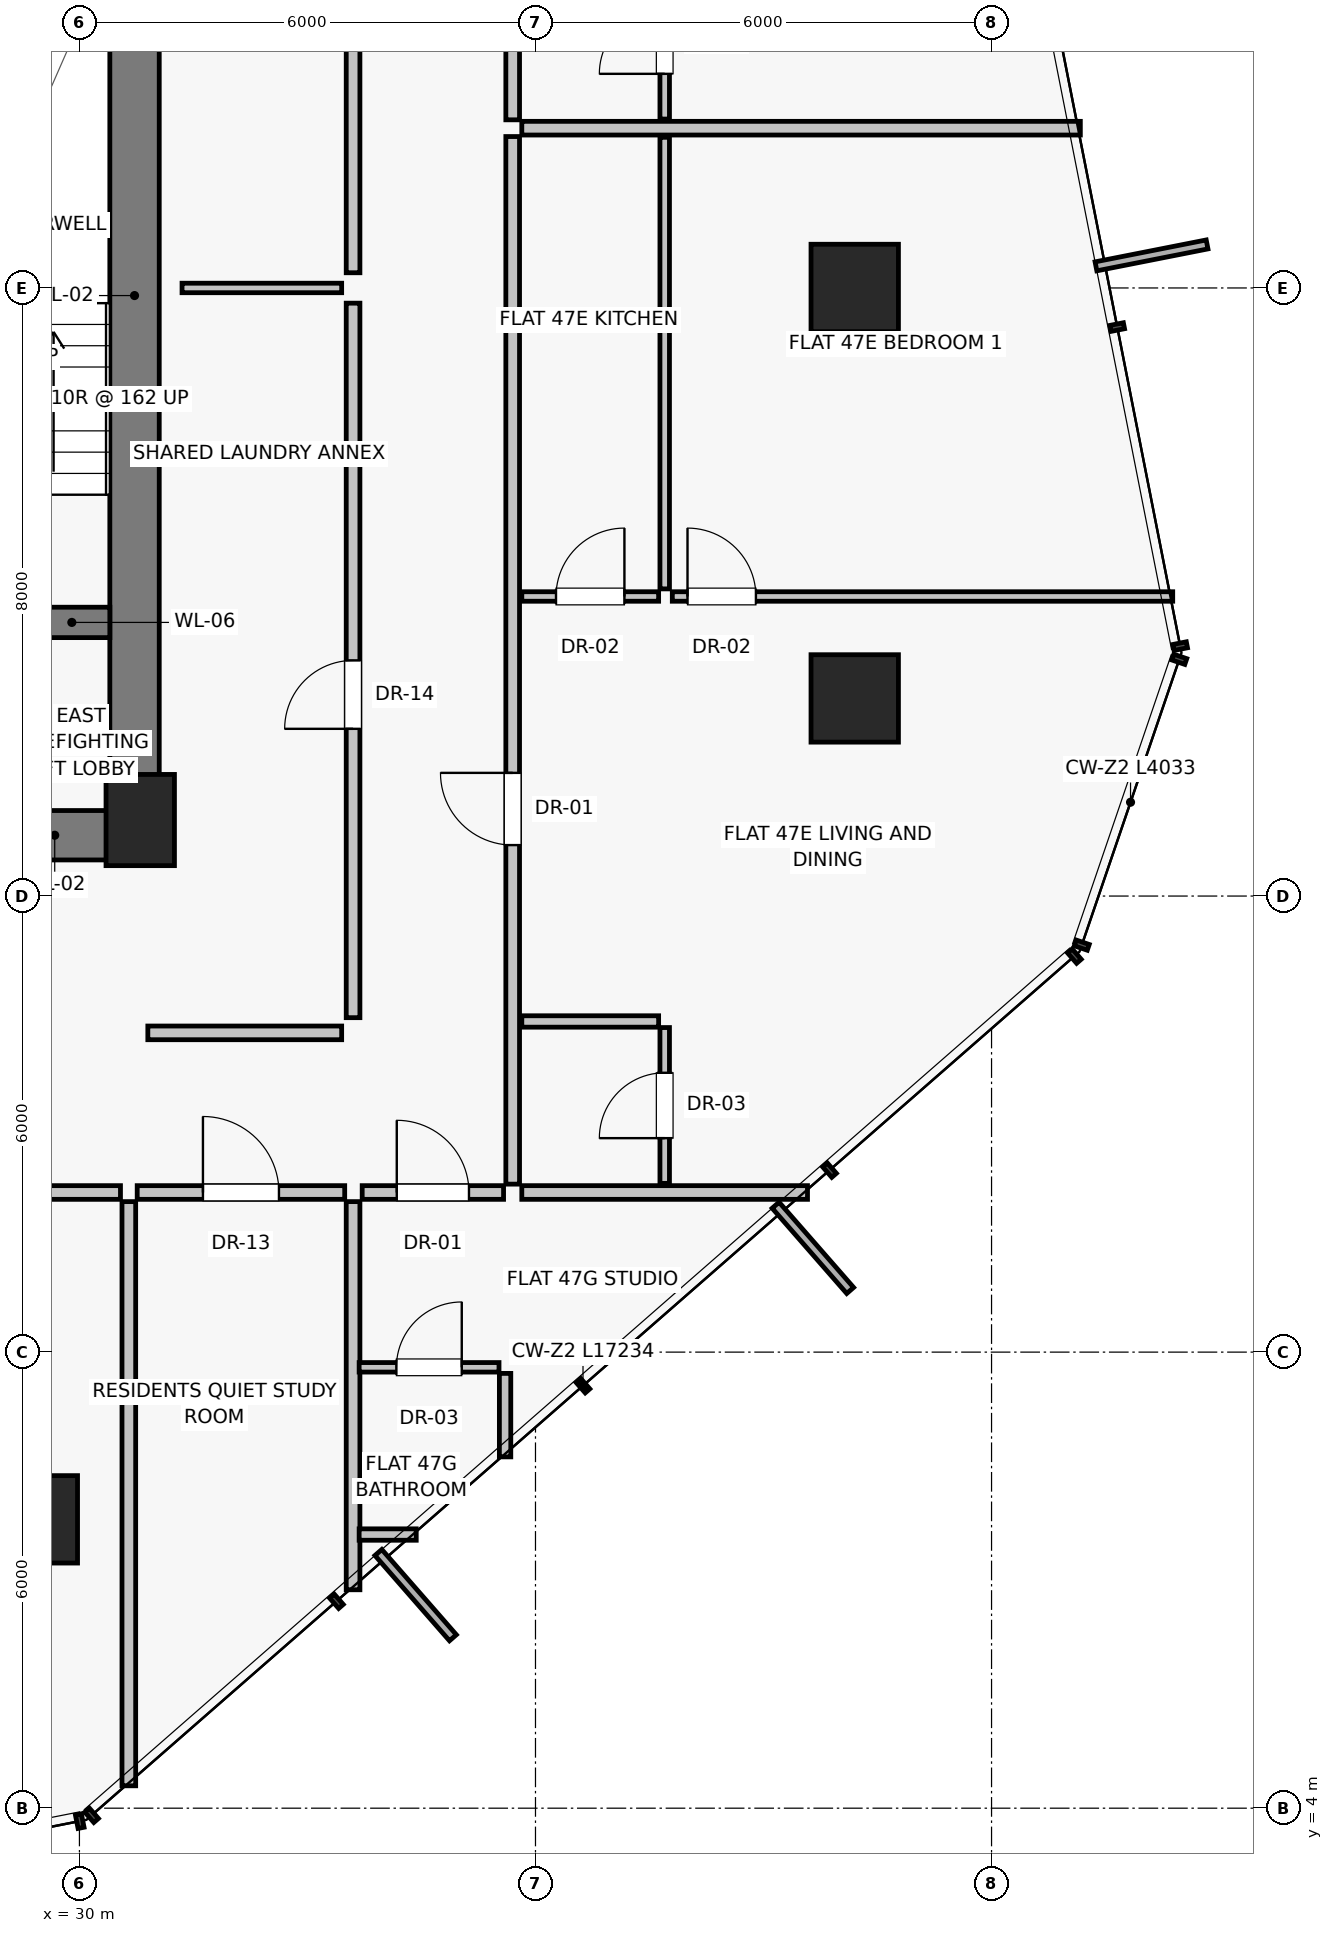
"""IFC4 building model, lengths in metres.
Left out: names, types, materials, properties, quantities, classifications, styles, units other than length and angle.
Written with IfcOpenShell. Run it as: python <this file> out.ifc"""

import sys

from ifc_helpers import new_model, si_unit, direction, frame, frame_2d, origin, origin_2d, place, context, subcontext, project, spatial, rectangle, extrude, source, transform, mapped, element, fill, save


model = new_model("IFC4")
c1 = context("Model", 3, precision=1e-05, world=origin(), true_north=direction((0.0, 1.0)))
c2 = subcontext(c1, "Body", "Model", "MODEL_VIEW")
j1 = project(units=[si_unit("LENGTHUNIT", "METRE"), si_unit("PLANEANGLEUNIT", "RADIAN")], contexts=[c1])
p1 = place(None, origin())
s1 = spatial("IfcSite", under=j1, at=p1, CompositionType="ELEMENT")
p2 = place(p1, origin())
s2 = spatial("IfcBuilding", under=s1, at=p2, CompositionType="ELEMENT")
p3 = place(p2, frame((0.0, 0.0, 166.3)))
s3 = spatial("IfcBuildingStorey", under=s2, at=p3, CompositionType="ELEMENT", Elevation=166.3)
p4 = place(p3, frame((30.8, 17.0, 0.0), z_axis=(0.0, 0.0, 1.0), x_axis=(1.0, 0.0, 0.0)))
e1 = element("IfcColumn", 1, at=p4, inside=s3, PredefinedType="PILASTER", context=c2, shape_type="SweptSolid", body=[
    extrude(rectangle(XDim=0.9, YDim=1.2, at=origin_2d()), origin(), (0.0, 0.0, 1.0), 3.25),
])
for number, where, z_axis, x_axis in (
    (2, (40.2, 18.6, 0.0), (0.0, 0.0, 1.0), (1.0, 0.0, 0.0)),
    (3, (40.2, 24.0, 0.0), (0.0, 0.0, 1.0), (1.0, 0.0, 0.0)),
    (4, (29.4, 7.8, 0.0), (0.0, 0.0, 1.0), (1.0, 0.0, 0.0)),
):
    element("IfcColumn", number, at=place(p3, frame(where, z_axis=z_axis, x_axis=x_axis)), inside=s3, PredefinedType="COLUMN", context=c2, shape_type="SweptSolid", body=[
        extrude(rectangle(XDim=1.15, YDim=1.15, at=origin_2d()), origin(), (0.0, 0.0, 1.0), 3.25),
    ])
p5 = place(p3, frame((30.725, 16.8, 0.0), z_axis=(0.0, 0.0, 1.0), x_axis=(0.0, 1.0, 0.0)))
e5 = element("IfcWall", 5, at=p5, inside=s3, PredefinedType="SHEAR", context=c2, shape_type="SweptSolid", body=[
    extrude(rectangle(XDim=14.2, YDim=0.65, at=frame_2d((7.1, 0.0))), origin(), (0.0, 0.0, 1.0), 2.93),
])
p6 = place(p3, frame((24.95, 16.8, 0.0), z_axis=(0.0, 0.0, 1.0), x_axis=(1.0, 0.0, 0.0)))
e6 = element("IfcWall", 6, at=p6, inside=s3, PredefinedType="SHEAR", context=c2, shape_type="SweptSolid", body=[
    extrude(rectangle(XDim=5.85, YDim=0.65, at=frame_2d((2.925, 0.0))), origin(), (0.0, 0.0, 1.0), 2.93),
])
p7 = place(p6, frame((2.15, 0.0, 0.0)))
e7 = element("IfcOpeningElement", 7, at=p7, cuts=e6, PredefinedType="OPENING", context=c2, shape_type="SweptSolid", body=[
    extrude(rectangle(XDim=1.2, YDim=2.03, at=frame_2d((0.6, 1.015))), frame((0.0, 0.335, 0.0), z_axis=(0.0, -1.0, 0.0), x_axis=(1.0, 0.0, 0.0)), (0.0, 0.0, 1.0), 0.67),
])
p8 = place(p3, frame((27.0, 19.6, 0.0), z_axis=(0.0, 0.0, 1.0), x_axis=(1.0, 0.0, 0.0)))
e8 = element("IfcWall", 8, at=p8, inside=s3, PredefinedType="SHEAR", context=c2, shape_type="SweptSolid", body=[
    extrude(rectangle(XDim=3.4, YDim=0.4, at=frame_2d((1.7, 0.0))), origin(), (0.0, 0.0, 1.0), 2.93),
])
p9 = place(p8, frame((1.05, 0.0, 0.0)))
e9 = element("IfcOpeningElement", 9, at=p9, cuts=e8, PredefinedType="OPENING", context=c2, shape_type="SweptSolid", body=[
    extrude(rectangle(XDim=1.1, YDim=2.03, at=frame_2d((0.55, 1.015))), frame((0.0, 0.21, 0.0), z_axis=(0.0, -1.0, 0.0), x_axis=(1.0, 0.0, 0.0)), (0.0, 0.0, 1.0), 0.42),
])
p10 = place(p3, frame((33.6, 14.4, 0.0), z_axis=(0.0, 0.0, 1.0), x_axis=(0.0, 1.0, 0.0)))
e10 = element("IfcWall", 10, at=p10, inside=s3, PredefinedType="PARTITIONING", context=c2, shape_type="SweptSolid", body=[
    extrude(rectangle(XDim=9.4, YDim=0.18, at=frame_2d((4.7, 0.0))), origin(), (0.0, 0.0, 1.0), 2.93),
])
p11 = place(p10, frame((3.8, 0.0, 0.0)))
e11 = element("IfcOpeningElement", 11, at=p11, cuts=e10, PredefinedType="OPENING", context=c2, shape_type="SweptSolid", body=[
    extrude(rectangle(XDim=0.9, YDim=2.01, at=frame_2d((0.45, 1.005))), frame((0.0, 0.1, 0.0), z_axis=(0.0, -1.0, 0.0), x_axis=(1.0, 0.0, 0.0)), (0.0, 0.0, 1.0), 0.2),
])
p12 = place(p3, frame((33.6, 24.2, 0.0), z_axis=(0.0, 0.0, 1.0), x_axis=(0.0, 1.0, 0.0)))
e12 = element("IfcWall", 12, at=p12, inside=s3, PredefinedType="PARTITIONING", context=c2, shape_type="SweptSolid", body=[
    extrude(rectangle(XDim=9.2, YDim=0.18, at=frame_2d((4.6, 0.0))), origin(), (0.0, 0.0, 1.0), 2.93),
])
p13 = place(p12, frame((3.8, 0.0, 0.0)))
e13 = element("IfcOpeningElement", 13, at=p13, cuts=e12, PredefinedType="OPENING", context=c2, shape_type="SweptSolid", body=[
    extrude(rectangle(XDim=0.9, YDim=2.01, at=frame_2d((0.45, 1.005))), frame((0.0, 0.1, 0.0), z_axis=(0.0, -1.0, 0.0), x_axis=(1.0, 0.0, 0.0)), (0.0, 0.0, 1.0), 0.2),
])
p14 = place(p3, frame((31.35, 24.0, 0.0), z_axis=(0.0, 0.0, 1.0), x_axis=(1.0, 0.0, 0.0)))
e14 = element("IfcWall", 14, at=p14, inside=s3, PredefinedType="PARTITIONING", context=c2, shape_type="SweptSolid", body=[
    extrude(rectangle(XDim=2.1, YDim=0.125, at=frame_2d((1.05, 0.0))), origin(), (0.0, 0.0, 1.0), 2.93),
])
p15 = place(p3, frame((30.9, 14.2, 0.0), z_axis=(0.0, 0.0, 1.0), x_axis=(1.0, 0.0, 0.0)))
e15 = element("IfcWall", 15, at=p15, inside=s3, PredefinedType="PARTITIONING", context=c2, shape_type="SweptSolid", body=[
    extrude(rectangle(XDim=2.55, YDim=0.18, at=frame_2d((1.275, 0.0))), origin(), (0.0, 0.0, 1.0), 2.93),
])
p16 = place(p3, frame((33.6, 11.98, 0.0), z_axis=(0.0, 0.0, 1.0), x_axis=(0.0, -1.0, 0.0)))
e16 = element("IfcWall", 16, at=p16, inside=s3, PredefinedType="PARTITIONING", context=c2, shape_type="SweptSolid", body=[
    extrude(rectangle(XDim=5.106, YDim=0.18, at=frame_2d((2.553, 0.0))), origin(), (0.0, 0.0, 1.0), 2.93),
])
p17 = place(p3, frame((30.76, 12.1, 0.0), z_axis=(0.0, 0.0, 1.0), x_axis=(1.0, 0.0, 0.0)))
e17 = element("IfcWall", 17, at=p17, inside=s3, PredefinedType="PARTITIONING", context=c2, shape_type="SweptSolid", body=[
    extrude(rectangle(XDim=2.73, YDim=0.18, at=frame_2d((1.365, 0.0))), origin(), (0.0, 0.0, 1.0), 2.93),
])
p18 = place(p17, frame((0.865, 0.0, 0.0)))
e18 = element("IfcOpeningElement", 18, at=p18, cuts=e17, PredefinedType="OPENING", context=c2, shape_type="SweptSolid", body=[
    extrude(rectangle(XDim=1.0, YDim=2.01, at=frame_2d((0.5, 1.005))), frame((0.0, 0.1, 0.0), z_axis=(0.0, -1.0, 0.0), x_axis=(1.0, 0.0, 0.0)), (0.0, 0.0, 1.0), 0.2),
])
p19 = place(p3, frame((30.65, 11.98, 0.0), z_axis=(0.0, 0.0, 1.0), x_axis=(0.0, -1.0, 0.0)))
e19 = element("IfcWall", 19, at=p19, inside=s3, PredefinedType="PARTITIONING", context=c2, shape_type="SweptSolid", body=[
    extrude(rectangle(XDim=7.685, YDim=0.18, at=frame_2d((3.843, 0.0))), origin(), (0.0, 0.0, 1.0), 2.93),
])
p20 = place(p3, frame((25.866, 12.1, 0.0), z_axis=(0.0, 0.0, 1.0), x_axis=(1.0, 0.0, 0.0)))
e20 = element("IfcWall", 20, at=p20, inside=s3, PredefinedType="PARTITIONING", context=c2, shape_type="SweptSolid", body=[
    extrude(rectangle(XDim=4.674, YDim=0.18, at=frame_2d((2.337, 0.0))), origin(), (0.0, 0.0, 1.0), 2.51),
])
p21 = place(p20, frame((2.66, 0.0, 0.0)))
e21 = element("IfcOpeningElement", 21, at=p21, cuts=e20, PredefinedType="OPENING", context=c2, shape_type="SweptSolid", body=[
    extrude(rectangle(XDim=0.95, YDim=2.02, at=frame_2d((0.475, 1.01))), frame((0.0, 0.1, 0.0), z_axis=(0.0, -1.0, 0.0), x_axis=(1.0, 0.0, 0.0)), (0.0, 0.0, 1.0), 0.2),
])
p22 = place(p3, frame((35.82, 12.1, 0.0), z_axis=(0.0, 0.0, 1.0), x_axis=(1.0, 0.0, 0.0)))
e22 = element("IfcWall", 22, at=p22, inside=s3, PredefinedType="PARTITIONING", context=c2, shape_type="SweptSolid", body=[
    extrude(rectangle(XDim=3.759, YDim=0.18, at=frame_2d((1.879, 0.0))), origin(), (0.0, 0.0, 1.0), 2.93),
])
p23 = place(p3, frame((35.7, 12.21, 0.0), z_axis=(0.0, 0.0, 1.0), x_axis=(0.0, 1.0, 0.0)))
e23 = element("IfcWall", 23, at=p23, inside=s3, PredefinedType="PARTITIONING", context=c2, shape_type="SweptSolid", body=[
    extrude(rectangle(XDim=13.782, YDim=0.18, at=frame_2d((6.891, 0.0))), origin(), (0.0, 0.0, 1.0), 2.51),
])
p24 = place(p23, frame((4.46, 0.0, 0.0)))
e24 = element("IfcOpeningElement", 24, at=p24, cuts=e23, PredefinedType="OPENING", context=c2, shape_type="SweptSolid", body=[
    extrude(rectangle(XDim=0.95, YDim=2.02, at=frame_2d((0.475, 1.01))), frame((0.0, 0.1, 0.0), z_axis=(0.0, -1.0, 0.0), x_axis=(1.0, 0.0, 0.0)), (0.0, 0.0, 1.0), 0.2),
])
p25 = place(p3, frame((35.82, 14.35, 0.0), z_axis=(0.0, 0.0, 1.0), x_axis=(1.0, 0.0, 0.0)))
e25 = element("IfcWall", 25, at=p25, inside=s3, PredefinedType="PARTITIONING", context=c2, shape_type="SweptSolid", body=[
    extrude(rectangle(XDim=1.8, YDim=0.15, at=frame_2d((0.9, 0.0))), origin(), (0.0, 0.0, 1.0), 2.93),
])
p26 = place(p3, frame((37.7, 12.22, 0.0), z_axis=(0.0, 0.0, 1.0), x_axis=(0.0, 1.0, 0.0)))
e26 = element("IfcWall", 26, at=p26, inside=s3, PredefinedType="PARTITIONING", context=c2, shape_type="SweptSolid", body=[
    extrude(rectangle(XDim=2.05, YDim=0.125, at=frame_2d((1.025, 0.0))), origin(), (0.0, 0.0, 1.0), 2.93),
])
p27 = place(p26, frame((0.595, 0.0, 0.0)))
e27 = element("IfcOpeningElement", 27, at=p27, cuts=e26, PredefinedType="OPENING", context=c2, shape_type="SweptSolid", body=[
    extrude(rectangle(XDim=0.86, YDim=2.01, at=frame_2d((0.43, 1.005))), frame((0.0, 0.073, 0.0), z_axis=(0.0, -1.0, 0.0), x_axis=(1.0, 0.0, 0.0)), (0.0, 0.0, 1.0), 0.145),
])
p28 = place(p3, frame((35.82, 19.941, 0.0), z_axis=(0.0, 0.0, 1.0), x_axis=(1.0, 0.0, 0.0)))
e28 = element("IfcWall", 28, at=p28, inside=s3, PredefinedType="PARTITIONING", context=c2, shape_type="SweptSolid", body=[
    extrude(rectangle(XDim=1.8, YDim=0.125, at=frame_2d((0.9, 0.0))), origin(), (0.0, 0.0, 1.0), 2.93),
])
p29 = place(p28, frame((0.45, 0.0, 0.0)))
e29 = element("IfcOpeningElement", 29, at=p29, cuts=e28, PredefinedType="OPENING", context=c2, shape_type="SweptSolid", body=[
    extrude(rectangle(XDim=0.9, YDim=2.01, at=frame_2d((0.45, 1.005))), frame((0.0, 0.073, 0.0), z_axis=(0.0, -1.0, 0.0), x_axis=(1.0, 0.0, 0.0)), (0.0, 0.0, 1.0), 0.145),
])
p30 = place(p3, frame((37.7, 20.041, 0.0), z_axis=(0.0, 0.0, 1.0), x_axis=(0.0, 1.0, 0.0)))
e30 = element("IfcWall", 30, at=p30, inside=s3, PredefinedType="PARTITIONING", context=c2, shape_type="SweptSolid", body=[
    extrude(rectangle(XDim=5.941, YDim=0.125, at=frame_2d((2.97, 0.0))), origin(), (0.0, 0.0, 1.0), 2.93),
])
p31 = place(p3, frame((37.8, 19.941, 0.0), z_axis=(0.0, 0.0, 1.0), x_axis=(1.0, 0.0, 0.0)))
e31 = element("IfcWall", 31, at=p31, inside=s3, PredefinedType="PARTITIONING", context=c2, shape_type="SweptSolid", body=[
    extrude(rectangle(XDim=6.583, YDim=0.125, at=frame_2d((3.292, 0.0))), origin(), (0.0, 0.0, 1.0), 2.93),
])
p32 = place(p31, frame((0.2, 0.0, 0.0)))
e32 = element("IfcOpeningElement", 32, at=p32, cuts=e31, PredefinedType="OPENING", context=c2, shape_type="SweptSolid", body=[
    extrude(rectangle(XDim=0.9, YDim=2.01, at=frame_2d((0.45, 1.005))), frame((0.0, 0.073, 0.0), z_axis=(0.0, -1.0, 0.0), x_axis=(1.0, 0.0, 0.0)), (0.0, 0.0, 1.0), 0.145),
])
p33 = place(p3, frame((35.82, 26.102, 0.0), z_axis=(0.0, 0.0, 1.0), x_axis=(1.0, 0.0, 0.0)))
e33 = element("IfcWall", 33, at=p33, inside=s3, PredefinedType="PARTITIONING", context=c2, shape_type="SweptSolid", body=[
    extrude(rectangle(XDim=7.348, YDim=0.18, at=frame_2d((3.674, 0.0))), origin(), (0.0, 0.0, 1.0), 2.93),
])
p34 = place(p3, frame((35.7, 26.212, 0.0), z_axis=(0.0, 0.0, 1.0), x_axis=(0.0, 1.0, 0.0)))
e34 = element("IfcWall", 34, at=p34, inside=s3, PredefinedType="PARTITIONING", context=c2, shape_type="SweptSolid", body=[
    extrude(rectangle(XDim=9.378, YDim=0.18, at=frame_2d((4.689, 0.0))), origin(), (0.0, 0.0, 1.0), 2.51),
])
p35 = place(p34, frame((3.132, 0.0, 0.0)))
e35 = element("IfcOpeningElement", 35, at=p35, cuts=e34, PredefinedType="OPENING", context=c2, shape_type="SweptSolid", body=[
    extrude(rectangle(XDim=0.95, YDim=2.02, at=frame_2d((0.475, 1.01))), frame((0.0, 0.1, 0.0), z_axis=(0.0, -1.0, 0.0), x_axis=(1.0, 0.0, 0.0)), (0.0, 0.0, 1.0), 0.2),
])
p36 = place(p3, frame((37.7, 26.222, 0.0), z_axis=(0.0, 0.0, 1.0), x_axis=(0.0, 1.0, 0.0)))
e36 = element("IfcWall", 36, at=p36, inside=s3, PredefinedType="PARTITIONING", context=c2, shape_type="SweptSolid", body=[
    extrude(rectangle(XDim=2.05, YDim=0.125, at=frame_2d((1.025, 0.0))), origin(), (0.0, 0.0, 1.0), 2.93),
])
p37 = place(p36, frame((0.595, 0.0, 0.0)))
e37 = element("IfcOpeningElement", 37, at=p37, cuts=e36, PredefinedType="OPENING", context=c2, shape_type="SweptSolid", body=[
    extrude(rectangle(XDim=0.86, YDim=2.01, at=frame_2d((0.43, 1.005))), frame((0.0, 0.073, 0.0), z_axis=(0.0, -1.0, 0.0), x_axis=(1.0, 0.0, 0.0)), (0.0, 0.0, 1.0), 0.145),
])
p38 = place(p3, frame((33.72, 12.1, 0.0), z_axis=(0.0, 0.0, 1.0), x_axis=(1.0, 0.0, 0.0)))
e38 = element("IfcWall", 38, at=p38, inside=s3, PredefinedType="PARTITIONING", context=c2, shape_type="SweptSolid", body=[
    extrude(rectangle(XDim=1.86, YDim=0.18, at=frame_2d((0.93, 0.0))), origin(), (0.0, 0.0, 1.0), 2.93),
])
p39 = place(p38, frame((0.455, 0.0, 0.0)))
e39 = element("IfcOpeningElement", 39, at=p39, cuts=e38, PredefinedType="OPENING", context=c2, shape_type="SweptSolid", body=[
    extrude(rectangle(XDim=0.95, YDim=2.02, at=frame_2d((0.475, 1.01))), frame((0.0, 0.1, 0.0), z_axis=(0.0, -1.0, 0.0), x_axis=(1.0, 0.0, 0.0)), (0.0, 0.0, 1.0), 0.2),
])
p40 = place(p3, frame((33.68, 9.8, 0.0), z_axis=(0.0, 0.0, 1.0), x_axis=(1.0, 0.0, 0.0)))
e40 = element("IfcWall", 40, at=p40, inside=s3, PredefinedType="PARTITIONING", context=c2, shape_type="SweptSolid", body=[
    extrude(rectangle(XDim=1.84, YDim=0.125, at=frame_2d((0.92, 0.0))), origin(), (0.0, 0.0, 1.0), 2.93),
])
p41 = place(p40, frame((0.49, 0.0, 0.0)))
e41 = element("IfcOpeningElement", 41, at=p41, cuts=e40, PredefinedType="OPENING", context=c2, shape_type="SweptSolid", body=[
    extrude(rectangle(XDim=0.86, YDim=2.01, at=frame_2d((0.43, 1.005))), frame((0.0, 0.073, 0.0), z_axis=(0.0, -1.0, 0.0), x_axis=(1.0, 0.0, 0.0)), (0.0, 0.0, 1.0), 0.145),
])
p42 = place(p3, frame((33.68, 7.6, 0.0), z_axis=(0.0, 0.0, 1.0), x_axis=(1.0, 0.0, 0.0)))
e42 = element("IfcWall", 42, at=p42, inside=s3, PredefinedType="PARTITIONING", context=c2, shape_type="SweptSolid", body=[
    extrude(rectangle(XDim=0.751, YDim=0.15, at=frame_2d((0.375, 0.0))), origin(), (0.0, 0.0, 1.0), 2.93),
])
p43 = place(p3, frame((35.6, 8.622, 0.0), z_axis=(0.0, 0.0, 1.0), x_axis=(0.0, 1.0, 0.0)))
e43 = element("IfcWall", 43, at=p43, inside=s3, PredefinedType="PARTITIONING", context=c2, shape_type="SweptSolid", body=[
    extrude(rectangle(XDim=1.098, YDim=0.15, at=frame_2d((0.549, 0.0))), origin(), (0.0, 0.0, 1.0), 2.93),
])
m1 = source(origin(), c2, "Body", "SweptSolid", [
    extrude(rectangle(XDim=0.9, YDim=2.01, at=frame_2d((0.45, 1.005))), frame((0.0, 0.025, 0.0), z_axis=(0.0, -1.0, 0.0), x_axis=(1.0, 0.0, 0.0)), (0.0, 0.0, 1.0), 0.05),
])
p44 = place(p11, origin())
e44 = element("IfcDoor", 44, at=p44, inside=s3, OperationType="SINGLE_SWING_LEFT", PredefinedType="DOOR", context=c2, shape_type="MappedRepresentation", body=[
    mapped(m1, transform((0.0, 0.0, 0.0), scale=1.0)),
])
fill(e11, e44)
m2 = source(origin(), c2, "Body", "SweptSolid", [
    extrude(rectangle(XDim=1.0, YDim=2.01, at=frame_2d((0.5, 1.005))), frame((0.0, 0.025, 0.0), z_axis=(0.0, -1.0, 0.0), x_axis=(1.0, 0.0, 0.0)), (0.0, 0.0, 1.0), 0.05),
])
p45 = place(p18, origin())
e45 = element("IfcDoor", 45, at=p45, inside=s3, OperationType="SINGLE_SWING_LEFT", PredefinedType="DOOR", context=c2, shape_type="MappedRepresentation", body=[
    mapped(m2, transform((0.0, 0.0, 0.0), scale=1.0)),
])
fill(e18, e45)
m3 = source(origin(), c2, "Body", "SweptSolid", [
    extrude(rectangle(XDim=0.95, YDim=2.02, at=frame_2d((0.475, 1.01))), frame((0.0, 0.025, 0.0), z_axis=(0.0, -1.0, 0.0), x_axis=(1.0, 0.0, 0.0)), (0.0, 0.0, 1.0), 0.05),
])
p46 = place(p24, origin())
e46 = element("IfcDoor", 46, at=p46, inside=s3, OperationType="SINGLE_SWING_RIGHT", PredefinedType="DOOR", context=c2, shape_type="MappedRepresentation", body=[
    mapped(m3, transform((0.0, 0.0, 0.0), scale=1.0)),
])
fill(e24, e46)
m4 = source(origin(), c2, "Body", "SweptSolid", [
    extrude(rectangle(XDim=0.86, YDim=2.01, at=frame_2d((0.43, 1.005))), frame((0.0, 0.025, 0.0), z_axis=(0.0, -1.0, 0.0), x_axis=(1.0, 0.0, 0.0)), (0.0, 0.0, 1.0), 0.05),
])
p47 = place(p27, origin())
e47 = element("IfcDoor", 47, at=p47, inside=s3, OperationType="SINGLE_SWING_LEFT", PredefinedType="DOOR", context=c2, shape_type="MappedRepresentation", body=[
    mapped(m4, transform((0.0, 0.0, 0.0), scale=1.0)),
])
fill(e27, e47)
p48 = place(p29, origin())
e48 = element("IfcDoor", 48, at=p48, inside=s3, OperationType="SINGLE_SWING_RIGHT", PredefinedType="DOOR", context=c2, shape_type="MappedRepresentation", body=[
    mapped(m1, transform((0.0, 0.0, 0.0), scale=1.0)),
])
fill(e29, e48)
p49 = place(p32, origin())
e49 = element("IfcDoor", 49, at=p49, inside=s3, OperationType="SINGLE_SWING_LEFT", PredefinedType="DOOR", context=c2, shape_type="MappedRepresentation", body=[
    mapped(m1, transform((0.0, 0.0, 0.0), scale=1.0)),
])
fill(e32, e49)
p50 = place(p37, origin())
e50 = element("IfcDoor", 50, at=p50, inside=s3, OperationType="SINGLE_SWING_LEFT", PredefinedType="DOOR", context=c2, shape_type="MappedRepresentation", body=[
    mapped(m4, transform((0.0, 0.0, 0.0), scale=1.0)),
])
fill(e37, e50)
p51 = place(p39, origin())
e51 = element("IfcDoor", 51, at=p51, inside=s3, OperationType="SINGLE_SWING_LEFT", PredefinedType="DOOR", context=c2, shape_type="MappedRepresentation", body=[
    mapped(m3, transform((0.0, 0.0, 0.0), scale=1.0)),
])
fill(e39, e51)
p52 = place(p41, origin())
e52 = element("IfcDoor", 52, at=p52, inside=s3, OperationType="SINGLE_SWING_RIGHT", PredefinedType="DOOR", context=c2, shape_type="MappedRepresentation", body=[
    mapped(m4, transform((0.0, 0.0, 0.0), scale=1.0)),
])
fill(e41, e52)
save(model, sys.argv[1])
